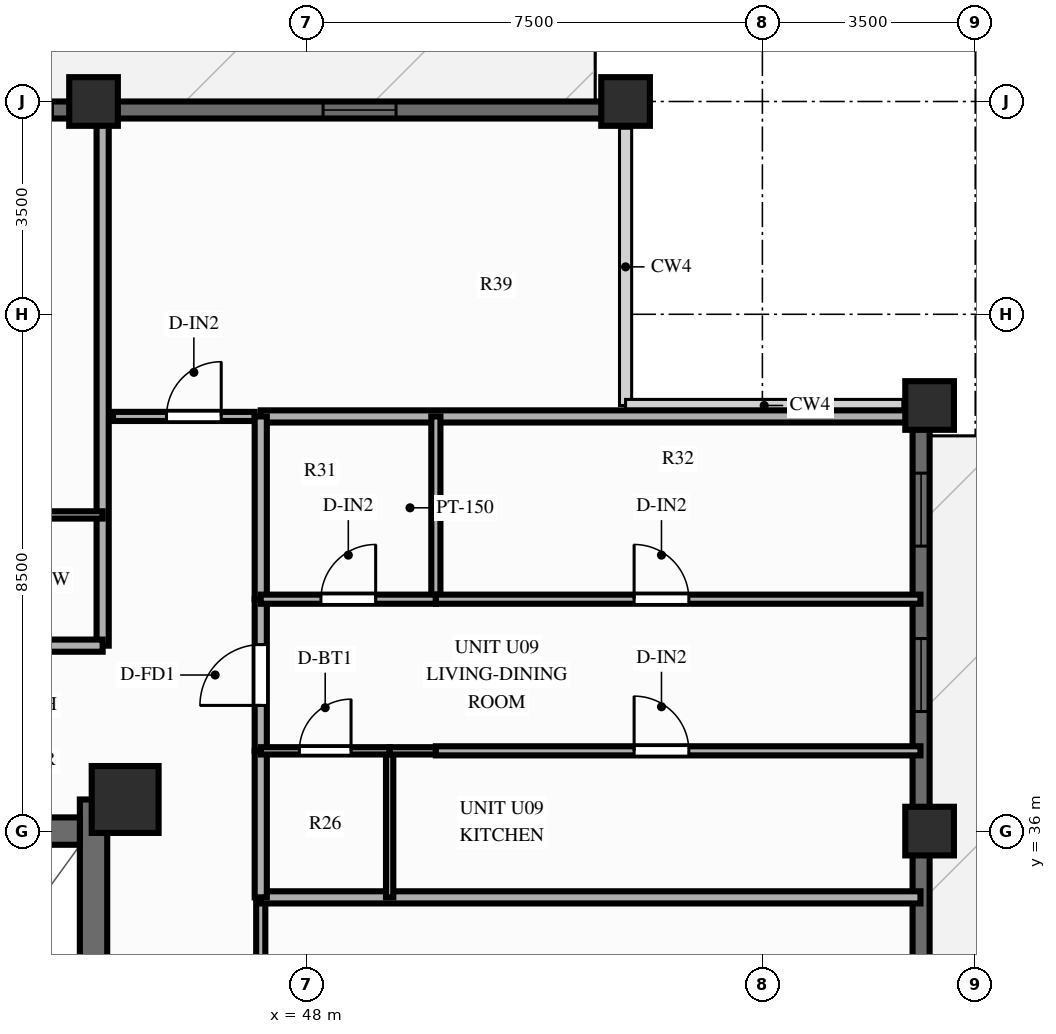
"""IFC4 building model, lengths in metres.
Left out: names, types, materials, properties, quantities, classifications, styles, units other than length and angle.
Written with IfcOpenShell. Run it as: python <this file> out.ifc"""

import sys

from ifc_helpers import new_model, si_unit, direction, frame, frame_2d, origin, origin_2d, place, context, subcontext, project, spatial, rectangle, extrude, source, transform, mapped, element, fill, save


model = new_model("IFC4")
c1 = context("Model", 3, precision=1e-05, world=origin(), true_north=direction((0.0, 1.0)))
c2 = subcontext(c1, "Body", "Model", "MODEL_VIEW")
j1 = project(units=[si_unit("LENGTHUNIT", "METRE"), si_unit("PLANEANGLEUNIT", "RADIAN")], contexts=[c1])
p1 = place(None, origin())
s1 = spatial("IfcSite", under=j1, at=p1, CompositionType="ELEMENT")
p2 = place(p1, origin())
s2 = spatial("IfcBuilding", under=s1, at=p2, CompositionType="ELEMENT")
p3 = place(p2, frame((0.0, 0.0, 186.7)))
s3 = spatial("IfcBuildingStorey", under=s2, at=p3, CompositionType="ELEMENT", Elevation=186.7)
p4 = place(p3, frame((44.5, 17.48, 0.0), z_axis=(0.0, 0.0, 1.0), x_axis=(0.0, 1.0, 0.0)))
e1 = element("IfcWall", 1, at=p4, inside=s3, PredefinedType="SHEAR", context=c2, shape_type="SweptSolid", body=[
    extrude(rectangle(XDim=19.04, YDim=0.45, at=frame_2d((9.52, 0.0))), origin(), (0.0, 0.0, 1.0), 3.0),
])
p5 = place(p4, frame((12.67, 0.0, 0.0), z_axis=(0.0, 0.0, 1.0), x_axis=(-1.0, 0.0, 0.0)))
e2 = element("IfcOpeningElement", 2, at=p5, cuts=e1, PredefinedType="OPENING", context=c2, shape_type="SweptSolid", body=[
    extrude(rectangle(XDim=1.1, YDim=2.15, at=frame_2d((0.55, 1.075))), frame((0.0, 0.237, 0.0), z_axis=(0.0, -1.0, 0.0), x_axis=(1.0, 0.0, 0.0)), (0.0, 0.0, 1.0), 0.474),
])
p6 = place(p3, frame((31.725, 36.0, 0.0), z_axis=(0.0, 0.0, 1.0), x_axis=(1.0, 0.0, 0.0)))
e3 = element("IfcWall", 3, at=p6, inside=s3, PredefinedType="SHEAR", context=c2, shape_type="SweptSolid", body=[
    extrude(rectangle(XDim=12.55, YDim=0.45, at=frame_2d((6.275, 0.0))), origin(), (0.0, 0.0, 1.0), 3.0),
])
p7 = place(p6, frame((5.225, 0.0, 0.0), z_axis=(0.0, 0.0, 1.0), x_axis=(-1.0, 0.0, 0.0)))
e4 = element("IfcOpeningElement", 4, at=p7, cuts=e3, PredefinedType="OPENING", context=c2, shape_type="SweptSolid", body=[
    extrude(rectangle(XDim=1.4, YDim=2.15, at=frame_2d((0.7, 1.075))), frame((0.0, 0.237, 0.0), z_axis=(0.0, -1.0, 0.0), x_axis=(1.0, 0.0, 0.0)), (0.0, 0.0, 1.0), 0.474),
])
m1 = source(origin(), c2, "Body", "SweptSolid", [
    extrude(rectangle(XDim=1.1, YDim=1.1, at=origin_2d()), origin(), (0.0, 0.0, 1.0), 3.0),
])
p8 = place(p3, frame((45.02, 36.52, 0.0), z_axis=(0.0, 0.0, 1.0), x_axis=(1.0, 0.0, 0.0)))
e5 = element("IfcColumn", 5, at=p8, inside=s3, PredefinedType="COLUMN", context=c2, shape_type="MappedRepresentation", body=[
    mapped(m1, transform((0.0, 0.0, 0.0), scale=1.0)),
])
m2 = source(origin(), c2, "Body", "SweptSolid", [
    extrude(rectangle(XDim=0.8, YDim=0.8, at=origin_2d()), origin(), (0.0, 0.0, 1.0), 3.0),
])
for number, where, z_axis, x_axis in (
    (6, (58.25, 36.0, 0.0), (0.0, 0.0, 1.0), (1.0, 0.0, 0.0)),
    (7, (58.25, 43.0, 0.0), (0.0, 0.0, 1.0), (1.0, 0.0, 0.0)),
    (8, (53.25, 48.0, 0.0), (0.0, 0.0, 1.0), (1.0, 0.0, 0.0)),
    (9, (44.5, 48.0, 0.0), (0.0, 0.0, 1.0), (1.0, 0.0, 0.0)),
):
    element("IfcColumn", number, at=place(p3, frame(where, z_axis=z_axis, x_axis=x_axis)), inside=s3, PredefinedType="COLUMN", context=c2, shape_type="MappedRepresentation", body=[
        mapped(m2, transform((0.0, 0.0, 0.0), scale=1.0)),
    ])
p9 = place(p3, frame((22.75, 47.86, 0.0), z_axis=(0.0, 0.0, 1.0), x_axis=(1.0, 0.0, 0.0)))
e10 = element("IfcWall", 10, at=p9, inside=s3, PredefinedType="SOLIDWALL", context=c2, shape_type="SweptSolid", body=[
    extrude(rectangle(XDim=30.5, YDim=0.28, at=frame_2d((15.25, 0.0))), origin(), (0.0, 0.0, 1.0), 2.28),
])
p10 = place(p9, frame((3.825, 0.0, 0.0)))
e11 = element("IfcOpeningElement", 11, at=p10, cuts=e10, PredefinedType="OPENING", context=c2, shape_type="SweptSolid", body=[
    extrude(rectangle(XDim=1.1, YDim=2.15, at=frame_2d((0.55, 1.075))), frame((0.0, 0.152, 0.0), z_axis=(0.0, -1.0, 0.0), x_axis=(1.0, 0.0, 0.0)), (0.0, 0.0, 1.0), 0.304),
])
p11 = place(p9, frame((9.395, 0.0, 0.25)))
e12 = element("IfcOpeningElement", 12, at=p11, cuts=e10, PredefinedType="OPENING", context=c2, shape_type="SweptSolid", body=[
    extrude(rectangle(XDim=0.95, YDim=1.5, at=frame_2d((0.475, 0.75))), frame((0.0, 0.152, 0.0), z_axis=(0.0, -1.0, 0.0), x_axis=(1.0, 0.0, 0.0)), (0.0, 0.0, 1.0), 0.304),
])
p12 = place(p9, frame((11.483, 0.0, 0.25)))
e13 = element("IfcOpeningElement", 13, at=p12, cuts=e10, PredefinedType="OPENING", context=c2, shape_type="SweptSolid", body=[
    extrude(rectangle(XDim=1.2, YDim=1.5, at=frame_2d((0.6, 0.75))), frame((0.0, 0.152, 0.0), z_axis=(0.0, -1.0, 0.0), x_axis=(1.0, 0.0, 0.0)), (0.0, 0.0, 1.0), 0.304),
])
p13 = place(p9, frame((14.383, 0.0, 0.25)))
e14 = element("IfcOpeningElement", 14, at=p13, cuts=e10, PredefinedType="OPENING", context=c2, shape_type="SweptSolid", body=[
    extrude(rectangle(XDim=1.2, YDim=1.5, at=frame_2d((0.6, 0.75))), frame((0.0, 0.152, 0.0), z_axis=(0.0, -1.0, 0.0), x_axis=(1.0, 0.0, 0.0)), (0.0, 0.0, 1.0), 0.304),
])
p14 = place(p9, frame((17.393, 0.0, 0.25)))
e15 = element("IfcOpeningElement", 15, at=p14, cuts=e10, PredefinedType="OPENING", context=c2, shape_type="SweptSolid", body=[
    extrude(rectangle(XDim=1.2, YDim=1.5, at=frame_2d((0.6, 0.75))), frame((0.0, 0.152, 0.0), z_axis=(0.0, -1.0, 0.0), x_axis=(1.0, 0.0, 0.0)), (0.0, 0.0, 1.0), 0.304),
])
p15 = place(p9, frame((19.874, 0.0, 0.25)))
e16 = element("IfcOpeningElement", 16, at=p15, cuts=e10, PredefinedType="OPENING", context=c2, shape_type="SweptSolid", body=[
    extrude(rectangle(XDim=1.2, YDim=1.5, at=frame_2d((0.6, 0.75))), frame((0.0, 0.152, 0.0), z_axis=(0.0, -1.0, 0.0), x_axis=(1.0, 0.0, 0.0)), (0.0, 0.0, 1.0), 0.304),
])
p16 = place(p9, frame((25.525, 0.0, 0.25)))
e17 = element("IfcOpeningElement", 17, at=p16, cuts=e10, PredefinedType="OPENING", context=c2, shape_type="SweptSolid", body=[
    extrude(rectangle(XDim=1.2, YDim=1.5, at=frame_2d((0.6, 0.75))), frame((0.0, 0.152, 0.0), z_axis=(0.0, -1.0, 0.0), x_axis=(1.0, 0.0, 0.0)), (0.0, 0.0, 1.0), 0.304),
])
p17 = place(p3, frame((58.11, 11.0, 0.0), z_axis=(0.0, 0.0, 1.0), x_axis=(0.0, 1.0, 0.0)))
e18 = element("IfcWall", 18, at=p17, inside=s3, PredefinedType="SOLIDWALL", context=c2, shape_type="SweptSolid", body=[
    extrude(rectangle(XDim=32.0, YDim=0.28, at=frame_2d((16.0, 0.0))), origin(), (0.0, 0.0, 1.0), 2.28),
])
p18 = place(p17, frame((2.9, 0.0, 0.25)))
e19 = element("IfcOpeningElement", 19, at=p18, cuts=e18, PredefinedType="OPENING", context=c2, shape_type="SweptSolid", body=[
    extrude(rectangle(XDim=1.2, YDim=1.5, at=frame_2d((0.6, 0.75))), frame((0.0, 0.152, 0.0), z_axis=(0.0, -1.0, 0.0), x_axis=(1.0, 0.0, 0.0)), (0.0, 0.0, 1.0), 0.304),
])
p19 = place(p17, frame((8.597, 0.0, 0.25)))
e20 = element("IfcOpeningElement", 20, at=p19, cuts=e18, PredefinedType="OPENING", context=c2, shape_type="SweptSolid", body=[
    extrude(rectangle(XDim=1.2, YDim=1.5, at=frame_2d((0.6, 0.75))), frame((0.0, 0.152, 0.0), z_axis=(0.0, -1.0, 0.0), x_axis=(1.0, 0.0, 0.0)), (0.0, 0.0, 1.0), 0.304),
])
p20 = place(p17, frame((11.05, 0.0, 0.25)))
e21 = element("IfcOpeningElement", 21, at=p20, cuts=e18, PredefinedType="OPENING", context=c2, shape_type="SweptSolid", body=[
    extrude(rectangle(XDim=1.2, YDim=1.5, at=frame_2d((0.6, 0.75))), frame((0.0, 0.152, 0.0), z_axis=(0.0, -1.0, 0.0), x_axis=(1.0, 0.0, 0.0)), (0.0, 0.0, 1.0), 0.304),
])
p21 = place(p17, frame((13.897, 0.0, 0.25)))
e22 = element("IfcOpeningElement", 22, at=p21, cuts=e18, PredefinedType="OPENING", context=c2, shape_type="SweptSolid", body=[
    extrude(rectangle(XDim=1.2, YDim=1.5, at=frame_2d((0.6, 0.75))), frame((0.0, 0.152, 0.0), z_axis=(0.0, -1.0, 0.0), x_axis=(1.0, 0.0, 0.0)), (0.0, 0.0, 1.0), 0.304),
])
p22 = place(p17, frame((20.755, 0.0, 0.0), z_axis=(0.0, 0.0, 1.0), x_axis=(-1.0, 0.0, 0.0)))
e23 = element("IfcOpeningElement", 23, at=p22, cuts=e18, PredefinedType="OPENING", context=c2, shape_type="SweptSolid", body=[
    extrude(rectangle(XDim=1.6, YDim=2.15, at=frame_2d((0.8, 1.075))), frame((0.0, 0.152, 0.0), z_axis=(0.0, -1.0, 0.0), x_axis=(1.0, 0.0, 0.0)), (0.0, 0.0, 1.0), 0.304),
])
p23 = place(p17, frame((26.967, 0.0, 0.25)))
e24 = element("IfcOpeningElement", 24, at=p23, cuts=e18, PredefinedType="OPENING", context=c2, shape_type="SweptSolid", body=[
    extrude(rectangle(XDim=1.2, YDim=1.5, at=frame_2d((0.6, 0.75))), frame((0.0, 0.152, 0.0), z_axis=(0.0, -1.0, 0.0), x_axis=(1.0, 0.0, 0.0)), (0.0, 0.0, 1.0), 0.304),
])
p24 = place(p17, frame((29.687, 0.0, 0.25)))
e25 = element("IfcOpeningElement", 25, at=p24, cuts=e18, PredefinedType="OPENING", context=c2, shape_type="SweptSolid", body=[
    extrude(rectangle(XDim=1.2, YDim=1.5, at=frame_2d((0.6, 0.75))), frame((0.0, 0.152, 0.0), z_axis=(0.0, -1.0, 0.0), x_axis=(1.0, 0.0, 0.0)), (0.0, 0.0, 1.0), 0.304),
])
p25 = place(p3, frame((44.82, 42.82, 0.0), z_axis=(0.0, 0.0, 1.0), x_axis=(1.0, 0.0, 0.0)))
e26 = element("IfcWall", 26, at=p25, inside=s3, PredefinedType="PARTITIONING", context=c2, shape_type="SweptSolid", body=[
    extrude(rectangle(XDim=2.33, YDim=0.15, at=frame_2d((1.165, 0.0))), origin(), (0.0, 0.0, 1.0), 2.79),
])
p26 = place(p25, frame((0.88, 0.0, 0.0)))
e27 = element("IfcOpeningElement", 27, at=p26, cuts=e26, PredefinedType="OPENING", context=c2, shape_type="SweptSolid", body=[
    extrude(rectangle(XDim=0.9, YDim=2.1, at=frame_2d((0.45, 1.05))), frame((0.0, 0.087, 0.0), z_axis=(0.0, -1.0, 0.0), x_axis=(1.0, 0.0, 0.0)), (0.0, 0.0, 1.0), 0.174),
])
p27 = place(p3, frame((44.65, 39.05, 0.0), z_axis=(0.0, 0.0, 1.0), x_axis=(0.0, 1.0, 0.0)))
e28 = element("IfcWall", 28, at=p27, inside=s3, PredefinedType="PARTITIONING", context=c2, shape_type="SweptSolid", body=[
    extrude(rectangle(XDim=8.8, YDim=0.2, at=frame_2d((4.4, 0.0))), origin(), (0.0, 0.0, 1.0), 2.39),
])
p28 = place(p3, frame((42.188, 39.05, 0.0), z_axis=(0.0, 0.0, 1.0), x_axis=(1.0, 0.0, 0.0)))
e29 = element("IfcWall", 29, at=p28, inside=s3, PredefinedType="PARTITIONING", context=c2, shape_type="SweptSolid", body=[
    extrude(rectangle(XDim=2.462, YDim=0.2, at=frame_2d((1.231, 0.0))), origin(), (0.0, 0.0, 1.0), 2.79),
])
p29 = place(p3, frame((42.188, 41.2, 0.0), z_axis=(0.0, 0.0, 1.0), x_axis=(1.0, 0.0, 0.0)))
e30 = element("IfcWall", 30, at=p29, inside=s3, PredefinedType="PARTITIONING", context=c2, shape_type="SweptSolid", body=[
    extrude(rectangle(XDim=2.462, YDim=0.12, at=frame_2d((1.231, 0.0))), origin(), (0.0, 0.0, 1.0), 2.79),
])
p30 = place(p3, frame((47.25, 42.82, 0.0), z_axis=(0.0, 0.0, 1.0), x_axis=(1.0, 0.0, 0.0)))
e31 = element("IfcWall", 31, at=p30, inside=s3, PredefinedType="PARTITIONING", context=c2, shape_type="SweptSolid", body=[
    extrude(rectangle(XDim=10.85, YDim=0.2, at=frame_2d((5.425, 0.0))), origin(), (0.0, 0.0, 1.0), 2.79),
])
p31 = place(p3, frame((47.25, 27.0, 0.0), z_axis=(0.0, 0.0, 1.0), x_axis=(0.0, 1.0, 0.0)))
e32 = element("IfcWall", 32, at=p31, inside=s3, PredefinedType="PARTITIONING", context=c2, shape_type="SweptSolid", body=[
    extrude(rectangle(XDim=7.91, YDim=0.15, at=frame_2d((3.955, 0.0))), origin(), (0.0, 0.0, 1.0), 2.79),
])
p32 = place(p31, frame((3.405, 0.0, 0.0)))
e33 = element("IfcOpeningElement", 33, at=p32, cuts=e32, PredefinedType="OPENING", context=c2, shape_type="SweptSolid", body=[
    extrude(rectangle(XDim=1.1, YDim=2.15, at=frame_2d((0.55, 1.075))), frame((0.0, 0.087, 0.0), z_axis=(0.0, -1.0, 0.0), x_axis=(1.0, 0.0, 0.0)), (0.0, 0.0, 1.0), 0.174),
])
p33 = place(p3, frame((47.25, 34.91, 0.0), z_axis=(0.0, 0.0, 1.0), x_axis=(1.0, 0.0, 0.0)))
e34 = element("IfcWall", 34, at=p33, inside=s3, PredefinedType="PARTITIONING", context=c2, shape_type="SweptSolid", body=[
    extrude(rectangle(XDim=10.85, YDim=0.2, at=frame_2d((5.425, 0.0))), origin(), (0.0, 0.0, 1.0), 2.79),
])
p34 = place(p3, frame((47.25, 34.91, 0.0), z_axis=(0.0, 0.0, 1.0), x_axis=(0.0, 1.0, 0.0)))
e35 = element("IfcWall", 35, at=p34, inside=s3, PredefinedType="PARTITIONING", context=c2, shape_type="SweptSolid", body=[
    extrude(rectangle(XDim=2.41, YDim=0.2, at=frame_2d((1.205, 0.0))), origin(), (0.0, 0.0, 1.0), 2.79),
])
p35 = place(p3, frame((47.25, 37.32, 0.0), z_axis=(0.0, 0.0, 1.0), x_axis=(0.0, 1.0, 0.0)))
e36 = element("IfcWall", 36, at=p35, inside=s3, PredefinedType="PARTITIONING", context=c2, shape_type="SweptSolid", body=[
    extrude(rectangle(XDim=2.494, YDim=0.2, at=frame_2d((1.247, 0.0))), origin(), (0.0, 0.0, 1.0), 2.79),
])
p36 = place(p35, frame((0.747, 0.0, 0.0)))
e37 = element("IfcOpeningElement", 37, at=p36, cuts=e36, PredefinedType="OPENING", context=c2, shape_type="SweptSolid", body=[
    extrude(rectangle(XDim=1.0, YDim=2.15, at=frame_2d((0.5, 1.075))), frame((0.0, 0.112, 0.0), z_axis=(0.0, -1.0, 0.0), x_axis=(1.0, 0.0, 0.0)), (0.0, 0.0, 1.0), 0.224),
])
p37 = place(p3, frame((47.25, 39.814, 0.0), z_axis=(0.0, 0.0, 1.0), x_axis=(0.0, 1.0, 0.0)))
e38 = element("IfcWall", 38, at=p37, inside=s3, PredefinedType="PARTITIONING", context=c2, shape_type="SweptSolid", body=[
    extrude(rectangle(XDim=3.006, YDim=0.2, at=frame_2d((1.503, 0.0))), origin(), (0.0, 0.0, 1.0), 2.79),
])
p38 = place(p3, frame((49.37, 34.91, 0.0), z_axis=(0.0, 0.0, 1.0), x_axis=(0.0, 1.0, 0.0)))
e39 = element("IfcWall", 39, at=p38, inside=s3, PredefinedType="PARTITIONING", context=c2, shape_type="SweptSolid", body=[
    extrude(rectangle(XDim=2.41, YDim=0.12, at=frame_2d((1.205, 0.0))), origin(), (0.0, 0.0, 1.0), 2.79),
])
p39 = place(p3, frame((50.13, 39.814, 0.0), z_axis=(0.0, 0.0, 1.0), x_axis=(0.0, 1.0, 0.0)))
e40 = element("IfcWall", 40, at=p39, inside=s3, PredefinedType="PARTITIONING", context=c2, shape_type="SweptSolid", body=[
    extrude(rectangle(XDim=3.006, YDim=0.15, at=frame_2d((1.503, 0.0))), origin(), (0.0, 0.0, 1.0), 2.79),
])
p40 = place(p3, frame((47.25, 37.32, 0.0), z_axis=(0.0, 0.0, 1.0), x_axis=(1.0, 0.0, 0.0)))
e41 = element("IfcWall", 41, at=p40, inside=s3, PredefinedType="PARTITIONING", context=c2, shape_type="SweptSolid", body=[
    extrude(rectangle(XDim=2.12, YDim=0.12, at=frame_2d((1.06, 0.0))), origin(), (0.0, 0.0, 1.0), 2.79),
])
p41 = place(p40, frame((0.635, 0.0, 0.0)))
e42 = element("IfcOpeningElement", 42, at=p41, cuts=e41, PredefinedType="OPENING", context=c2, shape_type="SweptSolid", body=[
    extrude(rectangle(XDim=0.85, YDim=2.05, at=frame_2d((0.425, 1.025))), frame((0.0, 0.072, 0.0), z_axis=(0.0, -1.0, 0.0), x_axis=(1.0, 0.0, 0.0)), (0.0, 0.0, 1.0), 0.144),
])
p42 = place(p3, frame((49.37, 37.32, 0.0), z_axis=(0.0, 0.0, 1.0), x_axis=(1.0, 0.0, 0.0)))
e43 = element("IfcWall", 43, at=p42, inside=s3, PredefinedType="PARTITIONING", context=c2, shape_type="SweptSolid", body=[
    extrude(rectangle(XDim=0.76, YDim=0.12, at=frame_2d((0.38, 0.0))), origin(), (0.0, 0.0, 1.0), 2.79),
])
p43 = place(p3, frame((50.13, 37.32, 0.0), z_axis=(0.0, 0.0, 1.0), x_axis=(1.0, 0.0, 0.0)))
e44 = element("IfcWall", 44, at=p43, inside=s3, PredefinedType="PARTITIONING", context=c2, shape_type="SweptSolid", body=[
    extrude(rectangle(XDim=7.97, YDim=0.15, at=frame_2d((3.985, 0.0))), origin(), (0.0, 0.0, 1.0), 2.79),
])
p44 = place(p43, frame((3.26, 0.0, 0.0)))
e45 = element("IfcOpeningElement", 45, at=p44, cuts=e44, PredefinedType="OPENING", context=c2, shape_type="SweptSolid", body=[
    extrude(rectangle(XDim=0.9, YDim=2.1, at=frame_2d((0.45, 1.05))), frame((0.0, 0.087, 0.0), z_axis=(0.0, -1.0, 0.0), x_axis=(1.0, 0.0, 0.0)), (0.0, 0.0, 1.0), 0.174),
])
p45 = place(p3, frame((47.25, 39.814, 0.0), z_axis=(0.0, 0.0, 1.0), x_axis=(1.0, 0.0, 0.0)))
e46 = element("IfcWall", 46, at=p45, inside=s3, PredefinedType="PARTITIONING", context=c2, shape_type="SweptSolid", body=[
    extrude(rectangle(XDim=2.88, YDim=0.15, at=frame_2d((1.44, 0.0))), origin(), (0.0, 0.0, 1.0), 2.79),
])
p46 = place(p45, frame((0.99, 0.0, 0.0)))
e47 = element("IfcOpeningElement", 47, at=p46, cuts=e46, PredefinedType="OPENING", context=c2, shape_type="SweptSolid", body=[
    extrude(rectangle(XDim=0.9, YDim=2.1, at=frame_2d((0.45, 1.05))), frame((0.0, 0.087, 0.0), z_axis=(0.0, -1.0, 0.0), x_axis=(1.0, 0.0, 0.0)), (0.0, 0.0, 1.0), 0.174),
])
p47 = place(p3, frame((50.13, 39.814, 0.0), z_axis=(0.0, 0.0, 1.0), x_axis=(1.0, 0.0, 0.0)))
e48 = element("IfcWall", 48, at=p47, inside=s3, PredefinedType="PARTITIONING", context=c2, shape_type="SweptSolid", body=[
    extrude(rectangle(XDim=7.97, YDim=0.15, at=frame_2d((3.985, 0.0))), origin(), (0.0, 0.0, 1.0), 2.79),
])
p48 = place(p47, frame((3.26, 0.0, 0.0)))
e49 = element("IfcOpeningElement", 49, at=p48, cuts=e48, PredefinedType="OPENING", context=c2, shape_type="SweptSolid", body=[
    extrude(rectangle(XDim=0.9, YDim=2.1, at=frame_2d((0.45, 1.05))), frame((0.0, 0.087, 0.0), z_axis=(0.0, -1.0, 0.0), x_axis=(1.0, 0.0, 0.0)), (0.0, 0.0, 1.0), 0.174),
])
m3 = source(origin(), c2, "Body", "SweptSolid", [
    extrude(rectangle(XDim=1.2, YDim=1.5, at=frame_2d((0.6, 0.75))), frame((0.0, 0.03, 0.0), z_axis=(0.0, -1.0, 0.0), x_axis=(1.0, 0.0, 0.0)), (0.0, 0.0, 1.0), 0.06),
])
p49 = place(p15, origin())
e50 = element("IfcWindow", 50, at=p49, inside=s3, PartitioningType="SINGLE_PANEL", PredefinedType="WINDOW", context=c2, shape_type="MappedRepresentation", body=[
    mapped(m3, transform((0.0, 0.0, 0.0), scale=1.0)),
])
fill(e16, e50)
p50 = place(p16, origin())
e51 = element("IfcWindow", 51, at=p50, inside=s3, PartitioningType="SINGLE_PANEL", PredefinedType="WINDOW", context=c2, shape_type="MappedRepresentation", body=[
    mapped(m3, transform((0.0, 0.0, 0.0), scale=1.0)),
])
fill(e17, e51)
p51 = place(p23, origin())
e52 = element("IfcWindow", 52, at=p51, inside=s3, PartitioningType="SINGLE_PANEL", PredefinedType="WINDOW", context=c2, shape_type="MappedRepresentation", body=[
    mapped(m3, transform((0.0, 0.0, 0.0), scale=1.0)),
])
fill(e24, e52)
p52 = place(p24, origin())
e53 = element("IfcWindow", 53, at=p52, inside=s3, PartitioningType="SINGLE_PANEL", PredefinedType="WINDOW", context=c2, shape_type="MappedRepresentation", body=[
    mapped(m3, transform((0.0, 0.0, 0.0), scale=1.0)),
])
fill(e25, e53)
m4 = source(origin(), c2, "Body", "SweptSolid", [
    extrude(rectangle(XDim=0.9, YDim=2.1, at=frame_2d((0.45, 1.05))), frame((0.0, 0.025, 0.0), z_axis=(0.0, -1.0, 0.0), x_axis=(1.0, 0.0, 0.0)), (0.0, 0.0, 1.0), 0.05),
])
p53 = place(p26, origin())
e54 = element("IfcDoor", 54, at=p53, inside=s3, OperationType="SINGLE_SWING_RIGHT", PredefinedType="DOOR", context=c2, shape_type="MappedRepresentation", body=[
    mapped(m4, transform((0.0, 0.0, 0.0), scale=1.0)),
])
fill(e27, e54)
m5 = source(origin(), c2, "Body", "SweptSolid", [
    extrude(rectangle(XDim=1.0, YDim=2.15, at=frame_2d((0.5, 1.075))), frame((0.0, 0.025, 0.0), z_axis=(0.0, -1.0, 0.0), x_axis=(1.0, 0.0, 0.0)), (0.0, 0.0, 1.0), 0.05),
])
p54 = place(p36, origin())
e55 = element("IfcDoor", 55, at=p54, inside=s3, OperationType="SINGLE_SWING_LEFT", PredefinedType="DOOR", context=c2, shape_type="MappedRepresentation", body=[
    mapped(m5, transform((0.0, 0.0, 0.0), scale=1.0)),
])
fill(e37, e55)
m6 = source(origin(), c2, "Body", "SweptSolid", [
    extrude(rectangle(XDim=0.85, YDim=2.05, at=frame_2d((0.425, 1.025))), frame((0.0, 0.025, 0.0), z_axis=(0.0, -1.0, 0.0), x_axis=(1.0, 0.0, 0.0)), (0.0, 0.0, 1.0), 0.05),
])
p55 = place(p41, origin())
e56 = element("IfcDoor", 56, at=p55, inside=s3, OperationType="SINGLE_SWING_RIGHT", PredefinedType="DOOR", context=c2, shape_type="MappedRepresentation", body=[
    mapped(m6, transform((0.0, 0.0, 0.0), scale=1.0)),
])
fill(e42, e56)
p56 = place(p44, origin())
e57 = element("IfcDoor", 57, at=p56, inside=s3, OperationType="SINGLE_SWING_LEFT", PredefinedType="DOOR", context=c2, shape_type="MappedRepresentation", body=[
    mapped(m4, transform((0.0, 0.0, 0.0), scale=1.0)),
])
fill(e45, e57)
p57 = place(p46, origin())
e58 = element("IfcDoor", 58, at=p57, inside=s3, OperationType="SINGLE_SWING_RIGHT", PredefinedType="DOOR", context=c2, shape_type="MappedRepresentation", body=[
    mapped(m4, transform((0.0, 0.0, 0.0), scale=1.0)),
])
fill(e47, e58)
p58 = place(p48, origin())
e59 = element("IfcDoor", 59, at=p58, inside=s3, OperationType="SINGLE_SWING_LEFT", PredefinedType="DOOR", context=c2, shape_type="MappedRepresentation", body=[
    mapped(m4, transform((0.0, 0.0, 0.0), scale=1.0)),
])
fill(e49, e59)
save(model, sys.argv[1])
